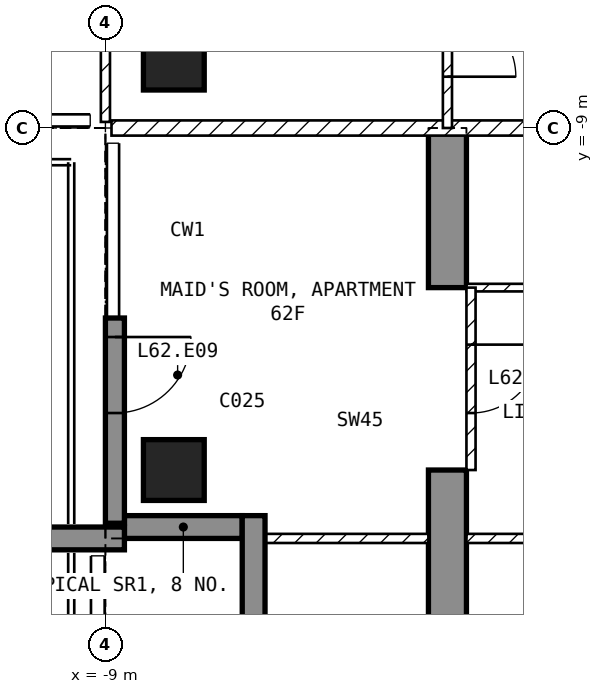
"""IFC4 building model, lengths in metres.
Left out: names, types, materials, properties, quantities, classifications, styles, units other than length and angle.
Written with IfcOpenShell. Run it as: python <this file> out.ifc"""

import sys

from ifc_helpers import new_model, si_unit, direction, frame, frame_2d, origin, origin_2d, place, context, subcontext, project, spatial, polyline, rectangle, outline, extrude, element, fill, save


model = new_model("IFC4")
c1 = context("Model", 3, precision=1e-05, world=origin(), true_north=direction((0.0, 1.0)))
c2 = subcontext(c1, "Body", "Model", "MODEL_VIEW")
j1 = project(units=[si_unit("LENGTHUNIT", "METRE"), si_unit("PLANEANGLEUNIT", "RADIAN")], contexts=[c1])
p1 = place(None, origin())
s1 = spatial("IfcSite", under=j1, at=p1, CompositionType="ELEMENT")
p2 = place(p1, origin())
s2 = spatial("IfcBuilding", under=s1, at=p2, CompositionType="ELEMENT")
p3 = place(p2, frame((0.0, 0.0, 246.5)))
s3 = spatial("IfcBuildingStorey", under=s2, at=p3, CompositionType="ELEMENT", Elevation=246.5)
for number, where, z_axis, x_axis in (
    (1, (-8.1, -13.5, -0.25), (0.0, 0.0, 1.0), (1.0, 0.0, 0.0)),
    (2, (-8.1, -8.1, -0.25), (0.0, 0.0, 1.0), (1.0, 0.0, 0.0)),
):
    element("IfcColumn", number, at=place(p3, frame(where, z_axis=z_axis, x_axis=x_axis)), inside=s3, PredefinedType="COLUMN", context=c2, shape_type="SweptSolid", body=[
        extrude(rectangle(XDim=0.8, YDim=0.8, at=origin_2d()), origin(), (0.0, 0.0, 1.0), 3.5),
    ])
p4 = place(p3, frame((-4.75, -16.7, -0.25), z_axis=(1.0, 0.0, 0.0), x_axis=(0.0, 1.0, 0.0)))
e3 = element("IfcWall", 3, at=p4, inside=s3, PredefinedType="SHEAR", context=c2, shape_type="SweptSolid", body=[
    extrude(outline(polyline([(0.0, 0.0), (3.2, 0.0), (3.2, 2.65), (5.6, 2.65), (5.6, 0.0), (7.7, 0.0), (7.7, 3.5), (0.0, 3.5), (0.0, 0.0)])), origin(), (0.0, 0.0, 1.0), 0.5),
])
p5 = place(p3, frame((-8.875, -11.5, 0.0), z_axis=(0.0, 0.0, 1.0), x_axis=(0.0, -1.0, 0.0)))
e4 = element("IfcWall", 4, at=p5, inside=s3, PredefinedType="SOLIDWALL", context=c2, shape_type="SweptSolid", body=[
    extrude(rectangle(XDim=2.7, YDim=0.25, at=frame_2d((1.35, 0.0))), origin(), (0.0, 0.0, 1.0), 3.25),
])
p6 = place(p5, frame((0.25, 0.0, 0.0)))
e5 = element("IfcOpeningElement", 5, at=p6, cuts=e4, PredefinedType="OPENING", context=c2, shape_type="SweptSolid", body=[
    extrude(rectangle(XDim=1.0, YDim=2.4, at=frame_2d((0.5, 1.2))), frame((0.0, 0.135, 0.0), z_axis=(0.0, -1.0, 0.0), x_axis=(1.0, 0.0, 0.0)), (0.0, 0.0, 1.0), 0.27),
])
p7 = place(p3, frame((-8.75, -14.25, 0.0), z_axis=(0.0, 0.0, 1.0), x_axis=(1.0, 0.0, 0.0)))
e6 = element("IfcWall", 6, at=p7, inside=s3, PredefinedType="SOLIDWALL", context=c2, shape_type="SweptSolid", body=[
    extrude(rectangle(XDim=1.55, YDim=0.3, at=frame_2d((0.775, 0.0))), origin(), (0.0, 0.0, 1.0), 3.25),
])
p8 = place(p3, frame((-7.05, -14.1, 0.0), z_axis=(0.0, 0.0, 1.0), x_axis=(0.0, -1.0, 0.0)))
e7 = element("IfcWall", 7, at=p8, inside=s3, PredefinedType="SOLIDWALL", context=c2, shape_type="SweptSolid", body=[
    extrude(rectangle(XDim=1.8, YDim=0.3, at=frame_2d((0.9, 0.0))), origin(), (0.0, 0.0, 1.0), 3.25),
])
p9 = place(p3, frame((-8.75, -14.4, 0.0), z_axis=(0.0, 0.0, 1.0), x_axis=(-1.0, 0.0, 0.0)))
e8 = element("IfcWall", 8, at=p9, inside=s3, PredefinedType="SOLIDWALL", context=c2, shape_type="SweptSolid", body=[
    extrude(rectangle(XDim=2.95, YDim=0.3, at=frame_2d((1.475, 0.0))), origin(), (0.0, 0.0, 1.0), 3.25),
])
p10 = place(p3, frame((8.92, -9.0, 0.0), z_axis=(0.0, 0.0, 1.0), x_axis=(-1.0, 0.0, 0.0)))
e9 = element("IfcWall", 9, at=p10, inside=s3, PredefinedType="PARTITIONING", context=c2, shape_type="SweptSolid", body=[
    extrude(rectangle(XDim=17.84, YDim=0.2, at=frame_2d((8.92, 0.0))), origin(), (0.0, 0.0, 1.0), 3.25),
])
p11 = place(p10, frame((8.42, 0.0, 0.0)))
e10 = element("IfcOpeningElement", 10, at=p11, cuts=e9, PredefinedType="OPENING", context=c2, shape_type="SweptSolid", body=[
    extrude(rectangle(XDim=1.0, YDim=2.1, at=frame_2d((0.5, 1.05))), frame((0.0, 0.11, 0.0), z_axis=(0.0, -1.0, 0.0), x_axis=(1.0, 0.0, 0.0)), (0.0, 0.0, 1.0), 0.22),
])
p12 = place(p3, frame((-9.0, -1.3, 0.0), z_axis=(0.0, 0.0, 1.0), x_axis=(0.0, -1.0, 0.0)))
e11 = element("IfcWall", 11, at=p12, inside=s3, PredefinedType="PARTITIONING", context=c2, shape_type="SweptSolid", body=[
    extrude(rectangle(XDim=7.62, YDim=0.12, at=frame_2d((3.81, 0.0))), origin(), (0.0, 0.0, 1.0), 3.25),
])
p13 = place(p12, frame((1.45, 0.0, 0.0)))
e12 = element("IfcOpeningElement", 12, at=p13, cuts=e11, PredefinedType="OPENING", context=c2, shape_type="SweptSolid", body=[
    extrude(rectangle(XDim=0.9, YDim=2.1, at=frame_2d((0.45, 1.05))), frame((0.0, 0.07, 0.0), z_axis=(0.0, -1.0, 0.0), x_axis=(1.0, 0.0, 0.0)), (0.0, 0.0, 1.0), 0.14),
])
p14 = place(p3, frame((-4.5, -6.75, 0.0), z_axis=(0.0, 0.0, 1.0), x_axis=(0.0, -1.0, 0.0)))
e13 = element("IfcWall", 13, at=p14, inside=s3, PredefinedType="PARTITIONING", context=c2, shape_type="SweptSolid", body=[
    extrude(rectangle(XDim=2.25, YDim=0.12, at=frame_2d((1.125, 0.0))), origin(), (0.0, 0.0, 1.0), 3.25),
])
p15 = place(p14, frame((0.675, 0.0, 0.0)))
e14 = element("IfcOpeningElement", 14, at=p15, cuts=e13, PredefinedType="OPENING", context=c2, shape_type="SweptSolid", body=[
    extrude(rectangle(XDim=0.9, YDim=2.1, at=frame_2d((0.45, 1.05))), frame((0.0, 0.07, 0.0), z_axis=(0.0, -1.0, 0.0), x_axis=(1.0, 0.0, 0.0)), (0.0, 0.0, 1.0), 0.14),
])
p16 = place(p3, frame((-2.1, -11.1, 0.0), z_axis=(0.0, 0.0, 1.0), x_axis=(-1.0, 0.0, 0.0)))
e15 = element("IfcWall", 15, at=p16, inside=s3, PredefinedType="PARTITIONING", context=c2, shape_type="SweptSolid", body=[
    extrude(rectangle(XDim=2.15, YDim=0.1, at=frame_2d((1.075, 0.0))), origin(), (0.0, 0.0, 1.0), 3.25),
])
p17 = place(p3, frame((4.25, -14.4, 0.0), z_axis=(0.0, 0.0, 1.0), x_axis=(-1.0, 0.0, 0.0)))
e16 = element("IfcWall", 16, at=p17, inside=s3, PredefinedType="PARTITIONING", context=c2, shape_type="SweptSolid", body=[
    extrude(rectangle(XDim=8.5, YDim=0.12, at=frame_2d((4.25, 0.0))), origin(), (0.0, 0.0, 1.0), 3.25),
])
p18 = place(p17, frame((5.675, 0.0, 0.0)))
e17 = element("IfcOpeningElement", 17, at=p18, cuts=e16, PredefinedType="OPENING", context=c2, shape_type="SweptSolid", body=[
    extrude(rectangle(XDim=0.9, YDim=2.1, at=frame_2d((0.45, 1.05))), frame((0.0, 0.07, 0.0), z_axis=(0.0, -1.0, 0.0), x_axis=(1.0, 0.0, 0.0)), (0.0, 0.0, 1.0), 0.14),
])
p19 = place(p3, frame((-4.75, -14.4, 0.0), z_axis=(0.0, 0.0, 1.0), x_axis=(-1.0, 0.0, 0.0)))
e18 = element("IfcWall", 18, at=p19, inside=s3, PredefinedType="PARTITIONING", context=c2, shape_type="SweptSolid", body=[
    extrude(rectangle(XDim=2.37, YDim=0.12, at=frame_2d((1.185, 0.0))), origin(), (0.0, 0.0, 1.0), 3.25),
])
p20 = place(p3, frame((-4.19, -11.1, 0.0), z_axis=(0.0, 0.0, 1.0), x_axis=(0.0, -1.0, 0.0)))
e19 = element("IfcWall", 19, at=p20, inside=s3, PredefinedType="PARTITIONING", context=c2, shape_type="SweptSolid", body=[
    extrude(rectangle(XDim=2.4, YDim=0.12, at=frame_2d((1.2, 0.0))), origin(), (0.0, 0.0, 1.0), 2.4),
])
p21 = place(p20, frame((0.75, 0.0, 0.0)))
e20 = element("IfcOpeningElement", 20, at=p21, cuts=e19, PredefinedType="OPENING", context=c2, shape_type="SweptSolid", body=[
    extrude(rectangle(XDim=0.9, YDim=2.1, at=frame_2d((0.45, 1.05))), frame((0.0, 0.07, 0.0), z_axis=(0.0, -1.0, 0.0), x_axis=(1.0, 0.0, 0.0)), (0.0, 0.0, 1.0), 0.14),
])
p22 = place(p6, origin())
e21 = element("IfcDoor", 21, at=p22, inside=s3, OperationType="SINGLE_SWING_LEFT", PredefinedType="DOOR", context=c2, shape_type="SweptSolid", body=[
    extrude(rectangle(XDim=1.0, YDim=2.4, at=frame_2d((0.5, 1.2))), frame((0.0, 0.025, 0.0), z_axis=(0.0, -1.0, 0.0), x_axis=(1.0, 0.0, 0.0)), (0.0, 0.0, 1.0), 0.05),
])
fill(e5, e21)
p23 = place(p15, origin())
e22 = element("IfcDoor", 22, at=p23, inside=s3, OperationType="SINGLE_SWING_RIGHT", PredefinedType="DOOR", context=c2, shape_type="SweptSolid", body=[
    extrude(rectangle(XDim=0.9, YDim=2.1, at=frame_2d((0.45, 1.05))), frame((0.0, 0.025, 0.0), z_axis=(0.0, -1.0, 0.0), x_axis=(1.0, 0.0, 0.0)), (0.0, 0.0, 1.0), 0.05),
])
fill(e14, e22)
p24 = place(p21, origin())
e23 = element("IfcDoor", 23, at=p24, inside=s3, OperationType="SINGLE_SWING_LEFT", PredefinedType="DOOR", context=c2, shape_type="SweptSolid", body=[
    extrude(rectangle(XDim=0.9, YDim=2.1, at=frame_2d((0.45, 1.05))), frame((0.0, 0.025, 0.0), z_axis=(0.0, -1.0, 0.0), x_axis=(1.0, 0.0, 0.0)), (0.0, 0.0, 1.0), 0.05),
])
fill(e20, e23)
save(model, sys.argv[1])
